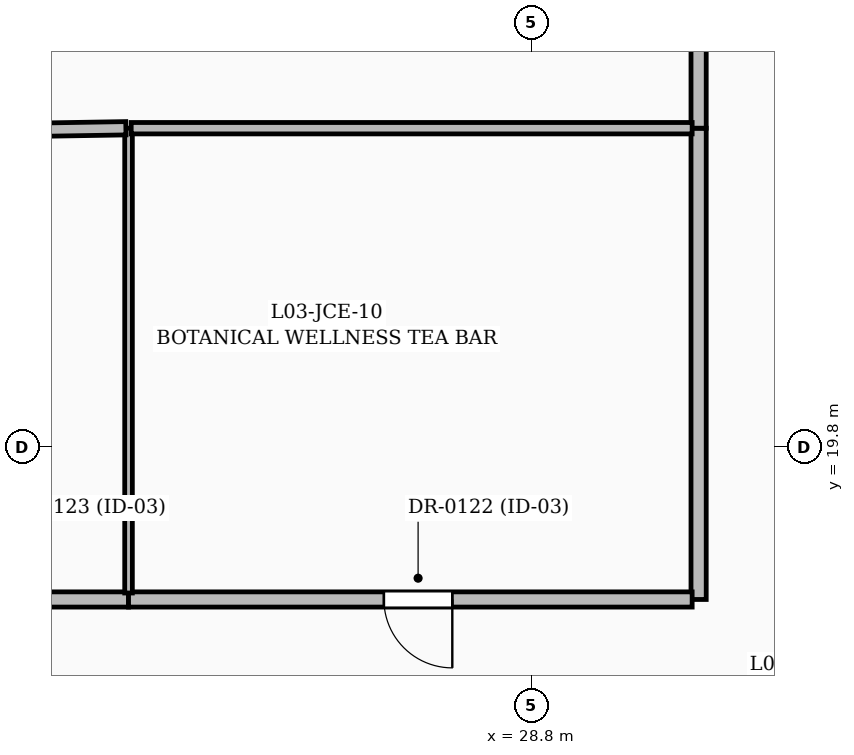
"""IFC4 building model, lengths in metres.
Left out: names, types, materials, properties, quantities, classifications, styles, units other than length and angle.
Written with IfcOpenShell. Run it as: python <this file> out.ifc"""

import sys

from ifc_helpers import new_model, si_unit, direction, frame, frame_2d, origin, place, context, subcontext, project, spatial, rectangle, extrude, element, fill, save


model = new_model("IFC4")
c1 = context("Model", 3, precision=1e-05, world=origin(), true_north=direction((0.0, 1.0)))
c2 = subcontext(c1, "Body", "Model", "MODEL_VIEW")
j1 = project(units=[si_unit("LENGTHUNIT", "METRE"), si_unit("PLANEANGLEUNIT", "RADIAN")], contexts=[c1])
p1 = place(None, origin())
s1 = spatial("IfcSite", under=j1, at=p1, CompositionType="ELEMENT")
p2 = place(p1, origin())
s2 = spatial("IfcBuilding", under=s1, at=p2, CompositionType="ELEMENT")
p3 = place(p2, frame((0.0, 0.0, 17.4)))
s3 = spatial("IfcBuildingStorey", under=s2, at=p3, CompositionType="ELEMENT", Elevation=17.4)
p4 = place(p3, frame((23.5, 17.8, 0.0), z_axis=(0.0, 0.0, 1.0), x_axis=(-1.0, 0.0, 0.0)))
e1 = element("IfcWall", 1, at=p4, inside=s3, PredefinedType="PARTITIONING", context=c2, shape_type="SweptSolid", body=[
    extrude(rectangle(XDim=3.0, YDim=0.2, at=frame_2d((1.5, 0.0))), origin(), (0.0, 0.0, 1.0), 3.078),
])
p5 = place(p4, frame((1.05, 0.0, 0.0)))
e2 = element("IfcOpeningElement", 2, at=p5, cuts=e1, PredefinedType="OPENING", context=c2, shape_type="SweptSolid", body=[
    extrude(rectangle(XDim=0.9, YDim=2.1, at=frame_2d((0.45, 1.05))), frame((0.0, 0.11, 0.0), z_axis=(0.0, -1.0, 0.0), x_axis=(1.0, 0.0, 0.0)), (0.0, 0.0, 1.0), 0.22),
])
p6 = place(p3, frame((31.0, 24.0, 0.0), z_axis=(0.0, 0.0, 1.0), x_axis=(0.0, -1.0, 0.0)))
e3 = element("IfcWall", 3, at=p6, inside=s3, PredefinedType="PARTITIONING", context=c2, shape_type="SweptSolid", body=[
    extrude(rectangle(XDim=6.2, YDim=0.2, at=frame_2d((3.1, 0.0))), origin(), (0.0, 0.0, 1.0), 3.078),
])
p7 = place(p3, frame((30.915, 17.8, 0.0), z_axis=(0.0, 0.0, 1.0), x_axis=(-1.0, 0.0, 0.0)))
e4 = element("IfcWall", 4, at=p7, inside=s3, PredefinedType="PARTITIONING", context=c2, shape_type="SweptSolid", body=[
    extrude(rectangle(XDim=7.415, YDim=0.2, at=frame_2d((3.708, 0.0))), origin(), (0.0, 0.0, 1.0), 3.078),
])
p8 = place(p7, frame((3.156, 0.0, 0.0)))
e5 = element("IfcOpeningElement", 5, at=p8, cuts=e4, PredefinedType="OPENING", context=c2, shape_type="SweptSolid", body=[
    extrude(rectangle(XDim=0.9, YDim=2.1, at=frame_2d((0.45, 1.05))), frame((0.0, 0.11, 0.0), z_axis=(0.0, -1.0, 0.0), x_axis=(1.0, 0.0, 0.0)), (0.0, 0.0, 1.0), 0.22),
])
p9 = place(p3, frame((31.0, 32.915, 0.0), z_axis=(0.0, 0.0, 1.0), x_axis=(0.0, -1.0, 0.0)))
e6 = element("IfcWall", 6, at=p9, inside=s3, PredefinedType="PARTITIONING", context=c2, shape_type="SweptSolid", body=[
    extrude(rectangle(XDim=8.915, YDim=0.2, at=frame_2d((4.458, 0.0))), origin(), (0.0, 0.0, 1.0), 3.71),
])
p10 = place(p9, frame((3.965, 0.0, 0.0)))
e7 = element("IfcOpeningElement", 7, at=p10, cuts=e6, PredefinedType="OPENING", context=c2, shape_type="SweptSolid", body=[
    extrude(rectangle(XDim=0.9, YDim=2.1, at=frame_2d((0.45, 1.05))), frame((0.0, 0.11, 0.0), z_axis=(0.0, -1.0, 0.0), x_axis=(1.0, 0.0, 0.0)), (0.0, 0.0, 1.0), 0.22),
])
p11 = place(p3, frame((23.5, 17.885, 0.0), z_axis=(0.0, 0.0, 1.0), x_axis=(0.0, 1.0, 0.0)))
e8 = element("IfcWall", 8, at=p11, inside=s3, PredefinedType="PARTITIONING", context=c2, shape_type="SweptSolid", body=[
    extrude(rectangle(XDim=6.115, YDim=0.1, at=frame_2d((3.058, 0.0))), origin(), (0.0, 0.0, 1.0), 3.078),
])
p12 = place(p3, frame((23.465, 23.999, 0.0), z_axis=(0.0, 0.0, 1.0), x_axis=(-0.999861314207, -0.016653899022, 0.0)))
e9 = element("IfcWall", 9, at=p12, inside=s3, PredefinedType="PARTITIONING", context=c2, shape_type="SweptSolid", body=[
    extrude(rectangle(XDim=4.281, YDim=0.175, at=frame_2d((2.14, 0.0))), origin(), (0.0, 0.0, 1.0), 3.71),
])
p13 = place(p3, frame((30.915, 24.0, 0.0), z_axis=(0.0, 0.0, 1.0), x_axis=(-1.0, 0.0, 0.0)))
e10 = element("IfcWall", 10, at=p13, inside=s3, PredefinedType="PARTITIONING", context=c2, shape_type="SweptSolid", body=[
    extrude(rectangle(XDim=7.38, YDim=0.15, at=frame_2d((3.69, 0.0))), origin(), (0.0, 0.0, 1.0), 3.078),
])
p14 = place(p8, origin())
e11 = element("IfcDoor", 11, at=p14, inside=s3, OperationType="SINGLE_SWING_LEFT", PredefinedType="DOOR", context=c2, shape_type="SweptSolid", body=[
    extrude(rectangle(XDim=0.9, YDim=2.1, at=frame_2d((0.45, 1.05))), frame((0.0, 0.025, 0.0), z_axis=(0.0, -1.0, 0.0), x_axis=(1.0, 0.0, 0.0)), (0.0, 0.0, 1.0), 0.05),
])
fill(e5, e11)
save(model, sys.argv[1])
